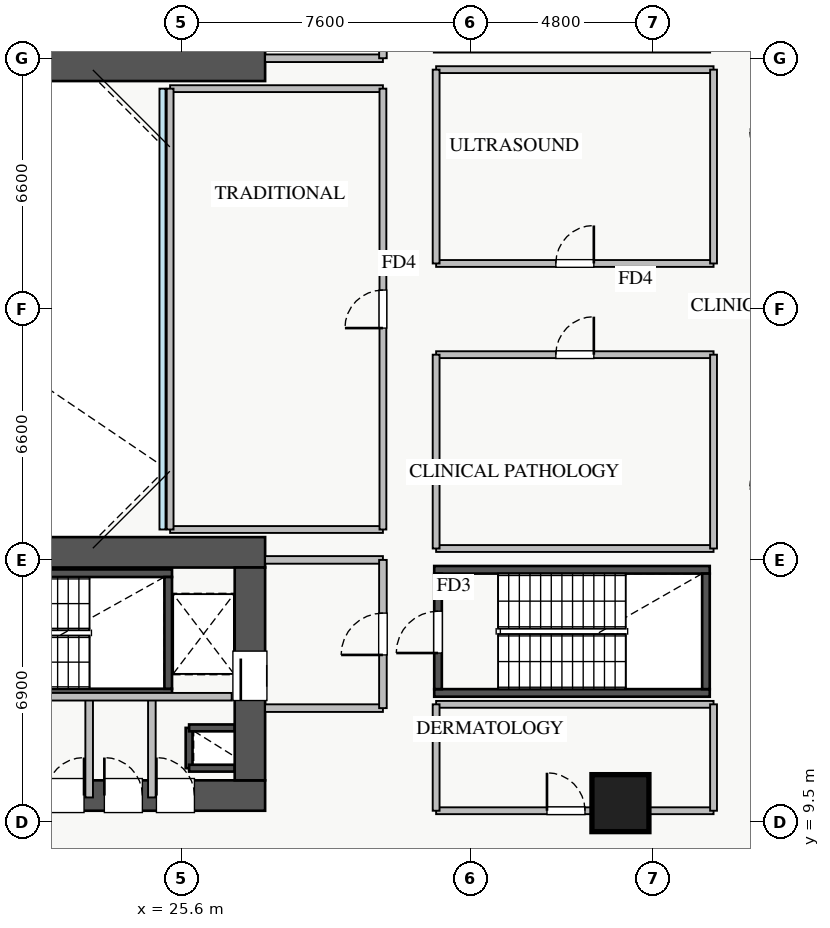
"""IFC4 building model, lengths in metres.
Left out: names, types, materials, properties, quantities, classifications, styles, units other than length and angle.
Written with IfcOpenShell. Run it as: python <this file> out.ifc"""

import sys

from ifc_helpers import new_model, si_unit, direction, frame, frame_2d, origin, origin_2d, place, context, subcontext, project, spatial, rectangle, extrude, source, transform, mapped, element, fill, save


model = new_model("IFC4")
c1 = context("Model", 3, precision=1e-05, world=origin(), true_north=direction((0.0, 1.0)))
c2 = subcontext(c1, "Body", "Model", "MODEL_VIEW")
j1 = project(units=[si_unit("LENGTHUNIT", "METRE"), si_unit("PLANEANGLEUNIT", "RADIAN")], contexts=[c1])
p1 = place(None, origin())
s1 = spatial("IfcSite", under=j1, at=p1, CompositionType="ELEMENT")
p2 = place(p1, origin())
s2 = spatial("IfcBuilding", under=s1, at=p2, CompositionType="ELEMENT")
p3 = place(p2, frame((0.0, 0.0, 9.4)))
s3 = spatial("IfcBuildingStorey", under=s2, at=p3, CompositionType="ELEMENT", Elevation=9.4)
p4 = place(p3, frame((25.8, 10.92, 0.0), z_axis=(0.0, 0.0, 1.0), x_axis=(0.0, 1.0, 0.0)))
e1 = element("IfcWall", 1, at=p4, inside=s3, PredefinedType="SHEAR", context=c2, shape_type="SweptSolid", body=[
    extrude(rectangle(XDim=1.06, YDim=0.18, at=frame_2d((0.53, 0.0))), origin(), (0.0, 0.0, 1.0), 4.18),
])
for number, where, z_axis, x_axis in (
    (2, (25.8, 11.98, 0.0), (0.0, 0.0, 1.0), (1.0, 0.0, 0.0)),
    (3, (25.8, 10.92, 0.0), (0.0, 0.0, 1.0), (1.0, 0.0, 0.0)),
):
    element("IfcWall", number, at=place(p3, frame(where, z_axis=z_axis, x_axis=x_axis)), inside=s3, PredefinedType="SHEAR", context=c2, shape_type="SweptSolid", body=[
        extrude(rectangle(XDim=1.2, YDim=0.18, at=frame_2d((0.6, 0.0))), origin(), (0.0, 0.0, 1.0), 4.18),
    ])
p5 = place(p3, frame((18.2, 12.91, 0.0), z_axis=(0.0, 0.0, 1.0), x_axis=(1.0, 0.0, 0.0)))
e4 = element("IfcWall", 4, at=p5, inside=s3, PredefinedType="SHEAR", context=c2, shape_type="SweptSolid", body=[
    extrude(rectangle(XDim=7.15, YDim=0.2, at=frame_2d((3.575, 0.0))), origin(), (0.0, 0.0, 1.0), 4.4),
])
p6 = place(p5, frame((0.35, 0.0, 0.0)))
e5 = element("IfcOpeningElement", 5, at=p6, cuts=e4, PredefinedType="OPENING", context=c2, shape_type="SweptSolid", body=[
    extrude(rectangle(XDim=1.1, YDim=2.05, at=frame_2d((0.55, 1.025))), frame((0.0, 0.11, 0.0), z_axis=(0.0, -1.0, 0.0), x_axis=(1.0, 0.0, 0.0)), (0.0, 0.0, 1.0), 0.22),
])
p7 = place(p3, frame((18.2, 16.05, 0.0), z_axis=(0.0, 0.0, 1.0), x_axis=(1.0, 0.0, 0.0)))
e6 = element("IfcWall", 6, at=p7, inside=s3, PredefinedType="SHEAR", context=c2, shape_type="SweptSolid", body=[
    extrude(rectangle(XDim=7.15, YDim=0.2, at=frame_2d((3.575, 0.0))), origin(), (0.0, 0.0, 1.0), 4.4),
])
p8 = place(p3, frame((25.25, 13.01, 0.0), z_axis=(0.0, 0.0, 1.0), x_axis=(0.0, 1.0, 0.0)))
e7 = element("IfcWall", 7, at=p8, inside=s3, PredefinedType="SHEAR", context=c2, shape_type="SweptSolid", body=[
    extrude(rectangle(XDim=2.94, YDim=0.2, at=frame_2d((1.47, 0.0))), origin(), (0.0, 0.0, 1.0), 4.4),
])
for number, where, z_axis, x_axis in (
    (8, (32.25, 29.86, 0.0), (0.0, 0.0, 1.0), (1.0, 0.0, 0.0)),
    (9, (32.25, 12.9, 0.0), (0.0, 0.0, 1.0), (1.0, 0.0, 0.0)),
    (10, (32.25, 16.14, 0.0), (0.0, 0.0, 1.0), (1.0, 0.0, 0.0)),
):
    element("IfcWall", number, at=place(p3, frame(where, z_axis=z_axis, x_axis=x_axis)), inside=s3, PredefinedType="SHEAR", context=c2, shape_type="SweptSolid", body=[
        extrude(rectangle(XDim=7.25, YDim=0.2, at=frame_2d((3.625, 0.0))), origin(), (0.0, 0.0, 1.0), 4.4),
    ])
p9 = place(p3, frame((32.35, 13.0, 0.0), z_axis=(0.0, 0.0, 1.0), x_axis=(0.0, 1.0, 0.0)))
e11 = element("IfcWall", 11, at=p9, inside=s3, PredefinedType="SHEAR", context=c2, shape_type="SweptSolid", body=[
    extrude(rectangle(XDim=3.04, YDim=0.2, at=frame_2d((1.52, 0.0))), origin(), (0.0, 0.0, 1.0), 4.4),
])
p10 = place(p9, frame((0.95, 0.0, 0.0)))
e12 = element("IfcOpeningElement", 12, at=p10, cuts=e11, PredefinedType="OPENING", context=c2, shape_type="SweptSolid", body=[
    extrude(rectangle(XDim=1.1, YDim=2.05, at=frame_2d((0.55, 1.025))), frame((0.0, 0.11, 0.0), z_axis=(0.0, -1.0, 0.0), x_axis=(1.0, 0.0, 0.0)), (0.0, 0.0, 1.0), 0.22),
])
p11 = place(p3, frame((39.4, 13.0, 0.0), z_axis=(0.0, 0.0, 1.0), x_axis=(0.0, 1.0, 0.0)))
e13 = element("IfcWall", 13, at=p11, inside=s3, PredefinedType="SHEAR", context=c2, shape_type="SweptSolid", body=[
    extrude(rectangle(XDim=3.04, YDim=0.2, at=frame_2d((1.52, 0.0))), origin(), (0.0, 0.0, 1.0), 4.4),
])
p12 = place(p3, frame((10.2, 29.4, 0.0), z_axis=(0.0, 0.0, 1.0), x_axis=(1.0, 0.0, 0.0)))
e14 = element("IfcWall", 14, at=p12, inside=s3, PredefinedType="SHEAR", context=c2, shape_type="SweptSolid", body=[
    extrude(rectangle(XDim=17.6, YDim=0.8, at=frame_2d((8.8, 0.0))), origin(), (0.0, 0.0, 1.0), 4.4),
])
p13 = place(p3, frame((10.2, 10.2, 0.0), z_axis=(0.0, 0.0, 1.0), x_axis=(1.0, 0.0, 0.0)))
e15 = element("IfcWall", 15, at=p13, inside=s3, PredefinedType="SHEAR", context=c2, shape_type="SweptSolid", body=[
    extrude(rectangle(XDim=17.6, YDim=0.8, at=frame_2d((8.8, 0.0))), origin(), (0.0, 0.0, 1.0), 4.4),
])
p14 = place(p13, frame((1.15, 0.0, 0.0)))
e16 = element("IfcOpeningElement", 16, at=p14, cuts=e15, PredefinedType="OPENING", context=c2, shape_type="SweptSolid", body=[
    extrude(rectangle(XDim=1.1, YDim=2.05, at=frame_2d((0.55, 1.025))), frame((0.0, 0.41, 0.0), z_axis=(0.0, -1.0, 0.0), x_axis=(1.0, 0.0, 0.0)), (0.0, 0.0, 1.0), 0.82),
])
p15 = place(p13, frame((8.3, 0.0, 0.0)))
e17 = element("IfcOpeningElement", 17, at=p15, cuts=e15, PredefinedType="OPENING", context=c2, shape_type="SweptSolid", body=[
    extrude(rectangle(XDim=1.1, YDim=2.05, at=frame_2d((0.55, 1.025))), frame((0.0, 0.41, 0.0), z_axis=(0.0, -1.0, 0.0), x_axis=(1.0, 0.0, 0.0)), (0.0, 0.0, 1.0), 0.82),
])
p16 = place(p13, frame((10.05, 0.0, 0.0)))
e18 = element("IfcOpeningElement", 18, at=p16, cuts=e15, PredefinedType="OPENING", context=c2, shape_type="SweptSolid", body=[
    extrude(rectangle(XDim=1.1, YDim=2.05, at=frame_2d((0.55, 1.025))), frame((0.0, 0.41, 0.0), z_axis=(0.0, -1.0, 0.0), x_axis=(1.0, 0.0, 0.0)), (0.0, 0.0, 1.0), 0.82),
])
p17 = place(p13, frame((14.74, 0.0, 0.0)))
e19 = element("IfcOpeningElement", 19, at=p17, cuts=e15, PredefinedType="OPENING", context=c2, shape_type="SweptSolid", body=[
    extrude(rectangle(XDim=1.0, YDim=2.05, at=frame_2d((0.5, 1.025))), frame((0.0, 0.41, 0.0), z_axis=(0.0, -1.0, 0.0), x_axis=(1.0, 0.0, 0.0)), (0.0, 0.0, 1.0), 0.82),
])
p18 = place(p13, frame((11.835, 0.0, 0.0)))
e20 = element("IfcOpeningElement", 20, at=p18, cuts=e15, PredefinedType="OPENING", context=c2, shape_type="SweptSolid", body=[
    extrude(rectangle(XDim=1.0, YDim=2.05, at=frame_2d((0.5, 1.025))), frame((0.0, 0.41, 0.0), z_axis=(0.0, -1.0, 0.0), x_axis=(1.0, 0.0, 0.0)), (0.0, 0.0, 1.0), 0.82),
])
p19 = place(p13, frame((13.37, 0.0, 0.0)))
e21 = element("IfcOpeningElement", 21, at=p19, cuts=e15, PredefinedType="OPENING", context=c2, shape_type="SweptSolid", body=[
    extrude(rectangle(XDim=1.0, YDim=2.05, at=frame_2d((0.5, 1.025))), frame((0.0, 0.41, 0.0), z_axis=(0.0, -1.0, 0.0), x_axis=(1.0, 0.0, 0.0)), (0.0, 0.0, 1.0), 0.82),
])
p20 = place(p3, frame((10.2, 16.6, 0.0), z_axis=(0.0, 0.0, 1.0), x_axis=(1.0, 0.0, 0.0)))
e22 = element("IfcWall", 22, at=p20, inside=s3, PredefinedType="SHEAR", context=c2, shape_type="SweptSolid", body=[
    extrude(rectangle(XDim=17.6, YDim=0.8, at=frame_2d((8.8, 0.0))), origin(), (0.0, 0.0, 1.0), 4.4),
])
p21 = place(p3, frame((27.4, 10.6, 0.0), z_axis=(0.0, 0.0, 1.0), x_axis=(0.0, 1.0, 0.0)))
e23 = element("IfcWall", 23, at=p21, inside=s3, PredefinedType="SHEAR", context=c2, shape_type="SweptSolid", body=[
    extrude(rectangle(XDim=5.6, YDim=0.8, at=frame_2d((2.8, 0.0))), origin(), (0.0, 0.0, 1.0), 4.4),
])
p22 = place(p21, frame((2.1, 0.0, 0.0)))
e24 = element("IfcOpeningElement", 24, at=p22, cuts=e23, PredefinedType="OPENING", context=c2, shape_type="SweptSolid", body=[
    extrude(rectangle(XDim=1.3, YDim=2.05, at=frame_2d((0.65, 1.025))), frame((0.0, 0.41, 0.0), z_axis=(0.0, -1.0, 0.0), x_axis=(1.0, 0.0, 0.0)), (0.0, 0.0, 1.0), 0.82),
])
m1 = source(origin(), c2, "Body", "SweptSolid", [
    extrude(rectangle(XDim=1.5, YDim=1.5, at=origin_2d()), origin(), (0.0, 0.0, 1.0), 4.4),
])
p23 = place(p3, frame((37.15, 10.0, 0.0), z_axis=(0.0, 0.0, 1.0), x_axis=(1.0, 0.0, 0.0)))
e25 = element("IfcColumn", 25, at=p23, inside=s3, PredefinedType="COLUMN", context=c2, shape_type="MappedRepresentation", body=[
    mapped(m1, transform((0.0, 0.0, 0.0), x_axis=(1.0, 0.0, 0.0), y_axis=(0.0, 1.0, 0.0), z_axis=(0.0, 0.0, 1.0), scale=1.0)),
])
p24 = place(p3, frame((27.8, 29.6, 0.0), z_axis=(0.0, 0.0, 1.0), x_axis=(1.0, 0.0, 0.0)))
e26 = element("IfcWall", 26, at=p24, inside=s3, PredefinedType="PARTITIONING", context=c2, shape_type="SweptSolid", body=[
    extrude(rectangle(XDim=3.1, YDim=0.2, at=frame_2d((1.55, 0.0))), origin(), (0.0, 0.0, 1.0), 3.475),
])
p25 = place(p3, frame((30.9, 29.6, 0.0), z_axis=(0.0, 0.0, 1.0), x_axis=(0.0, 1.0, 0.0)))
e27 = element("IfcWall", 27, at=p25, inside=s3, PredefinedType="PARTITIONING", context=c2, shape_type="SweptSolid", body=[
    extrude(rectangle(XDim=3.9, YDim=0.2, at=frame_2d((1.95, 0.0))), origin(), (0.0, 0.0, 1.0), 4.18),
])
p26 = place(p25, frame((1.4, 0.0, 0.0)))
e28 = element("IfcOpeningElement", 28, at=p26, cuts=e27, PredefinedType="OPENING", context=c2, shape_type="SweptSolid", body=[
    extrude(rectangle(XDim=1.1, YDim=2.05, at=frame_2d((0.55, 1.025))), frame((0.0, 0.11, 0.0), z_axis=(0.0, -1.0, 0.0), x_axis=(1.0, 0.0, 0.0)), (0.0, 0.0, 1.0), 0.22),
])
p27 = place(p3, frame((27.8, 16.4, 0.0), z_axis=(0.0, 0.0, 1.0), x_axis=(1.0, 0.0, 0.0)))
e29 = element("IfcWall", 29, at=p27, inside=s3, PredefinedType="PARTITIONING", context=c2, shape_type="SweptSolid", body=[
    extrude(rectangle(XDim=3.1, YDim=0.2, at=frame_2d((1.55, 0.0))), origin(), (0.0, 0.0, 1.0), 3.475),
])
p28 = place(p3, frame((27.8, 12.5, 0.0), z_axis=(0.0, 0.0, 1.0), x_axis=(1.0, 0.0, 0.0)))
e30 = element("IfcWall", 30, at=p28, inside=s3, PredefinedType="PARTITIONING", context=c2, shape_type="SweptSolid", body=[
    extrude(rectangle(XDim=3.1, YDim=0.2, at=frame_2d((1.55, 0.0))), origin(), (0.0, 0.0, 1.0), 3.325),
])
p29 = place(p3, frame((30.9, 12.5, 0.0), z_axis=(0.0, 0.0, 1.0), x_axis=(0.0, 1.0, 0.0)))
e31 = element("IfcWall", 31, at=p29, inside=s3, PredefinedType="PARTITIONING", context=c2, shape_type="SweptSolid", body=[
    extrude(rectangle(XDim=3.9, YDim=0.2, at=frame_2d((1.95, 0.0))), origin(), (0.0, 0.0, 1.0), 4.18),
])
p30 = place(p29, frame((1.4, 0.0, 0.0)))
e32 = element("IfcOpeningElement", 32, at=p30, cuts=e31, PredefinedType="OPENING", context=c2, shape_type="SweptSolid", body=[
    extrude(rectangle(XDim=1.1, YDim=2.05, at=frame_2d((0.55, 1.025))), frame((0.0, 0.11, 0.0), z_axis=(0.0, -1.0, 0.0), x_axis=(1.0, 0.0, 0.0)), (0.0, 0.0, 1.0), 0.22),
])
for number, where, z_axis, x_axis in (
    (33, (24.82, 10.15, 0.0), (0.0, 0.0, 1.0), (0.0, 1.0, 0.0)),
    (34, (23.17, 10.15, 0.0), (0.0, 0.0, 1.0), (0.0, 1.0, 0.0)),
):
    element("IfcWall", number, at=place(p3, frame(where, z_axis=z_axis, x_axis=x_axis)), inside=s3, PredefinedType="PARTITIONING", context=c2, shape_type="SweptSolid", body=[
        extrude(rectangle(XDim=2.65, YDim=0.2, at=frame_2d((1.325, 0.0))), origin(), (0.0, 0.0, 1.0), 4.18),
    ])
p31 = place(p3, frame((21.75, 12.8, 0.0), z_axis=(0.0, 0.0, 1.0), x_axis=(1.0, 0.0, 0.0)))
e35 = element("IfcWall", 35, at=p31, inside=s3, PredefinedType="PARTITIONING", context=c2, shape_type="SweptSolid", body=[
    extrude(rectangle(XDim=5.17, YDim=0.2, at=frame_2d((2.585, 0.0))), origin(), (0.0, 0.0, 1.0), 4.18),
])
for number, where, z_axis, x_axis in (
    (36, (25.3, 17.2, 0.0), (0.0, 0.0, 1.0), (1.0, 0.0, 0.0)),
    (37, (25.3, 28.8, 0.0), (0.0, 0.0, 1.0), (1.0, 0.0, 0.0)),
):
    element("IfcWall", number, at=place(p3, frame(where, z_axis=z_axis, x_axis=x_axis)), inside=s3, PredefinedType="PARTITIONING", context=c2, shape_type="SweptSolid", body=[
        extrude(rectangle(XDim=5.6, YDim=0.18, at=frame_2d((2.8, 0.0))), origin(), (0.0, 0.0, 1.0), 4.18),
    ])
p32 = place(p3, frame((25.3, 17.2, 0.0), z_axis=(0.0, 0.0, 1.0), x_axis=(0.0, 1.0, 0.0)))
e38 = element("IfcWall", 38, at=p32, inside=s3, PredefinedType="PARTITIONING", context=c2, shape_type="SweptSolid", body=[
    extrude(rectangle(XDim=11.6, YDim=0.18, at=frame_2d((5.8, 0.0))), origin(), (0.0, 0.0, 1.0), 4.18),
])
p33 = place(p3, frame((30.9, 17.2, 0.0), z_axis=(0.0, 0.0, 1.0), x_axis=(0.0, 1.0, 0.0)))
e39 = element("IfcWall", 39, at=p33, inside=s3, PredefinedType="PARTITIONING", context=c2, shape_type="SweptSolid", body=[
    extrude(rectangle(XDim=11.6, YDim=0.18, at=frame_2d((5.8, 0.0))), origin(), (0.0, 0.0, 1.0), 4.18),
])
p34 = place(p33, frame((5.3, 0.0, 0.0)))
e40 = element("IfcOpeningElement", 40, at=p34, cuts=e39, PredefinedType="OPENING", context=c2, shape_type="SweptSolid", body=[
    extrude(rectangle(XDim=1.0, YDim=2.05, at=frame_2d((0.5, 1.025))), frame((0.0, 0.1, 0.0), z_axis=(0.0, -1.0, 0.0), x_axis=(1.0, 0.0, 0.0)), (0.0, 0.0, 1.0), 0.2),
])
p35 = place(p3, frame((32.3, 24.2, 0.0), z_axis=(0.0, 0.0, 1.0), x_axis=(1.0, 0.0, 0.0)))
e41 = element("IfcWall", 41, at=p35, inside=s3, PredefinedType="PARTITIONING", context=c2, shape_type="SweptSolid", body=[
    extrude(rectangle(XDim=7.3, YDim=0.18, at=frame_2d((3.65, 0.0))), origin(), (0.0, 0.0, 1.0), 4.18),
])
p36 = place(p35, frame((3.15, 0.0, 0.0)))
e42 = element("IfcOpeningElement", 42, at=p36, cuts=e41, PredefinedType="OPENING", context=c2, shape_type="SweptSolid", body=[
    extrude(rectangle(XDim=1.0, YDim=2.05, at=frame_2d((0.5, 1.025))), frame((0.0, 0.1, 0.0), z_axis=(0.0, -1.0, 0.0), x_axis=(1.0, 0.0, 0.0)), (0.0, 0.0, 1.0), 0.2),
])
p37 = place(p3, frame((32.3, 29.3, 0.0), z_axis=(0.0, 0.0, 1.0), x_axis=(1.0, 0.0, 0.0)))
e43 = element("IfcWall", 43, at=p37, inside=s3, PredefinedType="PARTITIONING", context=c2, shape_type="SweptSolid", body=[
    extrude(rectangle(XDim=7.3, YDim=0.18, at=frame_2d((3.65, 0.0))), origin(), (0.0, 0.0, 1.0), 3.475),
])
for number, where, z_axis, x_axis in (
    (44, (32.3, 24.2, 0.0), (0.0, 0.0, 1.0), (0.0, 1.0, 0.0)),
    (45, (39.6, 24.2, 0.0), (0.0, 0.0, 1.0), (0.0, 1.0, 0.0)),
):
    element("IfcWall", number, at=place(p3, frame(where, z_axis=z_axis, x_axis=x_axis)), inside=s3, PredefinedType="PARTITIONING", context=c2, shape_type="SweptSolid", body=[
        extrude(rectangle(XDim=5.1, YDim=0.18, at=frame_2d((2.55, 0.0))), origin(), (0.0, 0.0, 1.0), 4.18),
    ])
p38 = place(p3, frame((32.3, 16.7, 0.0), z_axis=(0.0, 0.0, 1.0), x_axis=(1.0, 0.0, 0.0)))
e46 = element("IfcWall", 46, at=p38, inside=s3, PredefinedType="PARTITIONING", context=c2, shape_type="SweptSolid", body=[
    extrude(rectangle(XDim=7.3, YDim=0.18, at=frame_2d((3.65, 0.0))), origin(), (0.0, 0.0, 1.0), 3.475),
])
p39 = place(p3, frame((32.3, 21.8, 0.0), z_axis=(0.0, 0.0, 1.0), x_axis=(1.0, 0.0, 0.0)))
e47 = element("IfcWall", 47, at=p39, inside=s3, PredefinedType="PARTITIONING", context=c2, shape_type="SweptSolid", body=[
    extrude(rectangle(XDim=7.3, YDim=0.18, at=frame_2d((3.65, 0.0))), origin(), (0.0, 0.0, 1.0), 4.18),
])
p40 = place(p39, frame((3.15, 0.0, 0.0)))
e48 = element("IfcOpeningElement", 48, at=p40, cuts=e47, PredefinedType="OPENING", context=c2, shape_type="SweptSolid", body=[
    extrude(rectangle(XDim=1.0, YDim=2.05, at=frame_2d((0.5, 1.025))), frame((0.0, 0.1, 0.0), z_axis=(0.0, -1.0, 0.0), x_axis=(1.0, 0.0, 0.0)), (0.0, 0.0, 1.0), 0.2),
])
for number, where, z_axis, x_axis in (
    (49, (32.3, 16.7, 0.0), (0.0, 0.0, 1.0), (0.0, 1.0, 0.0)),
    (50, (39.6, 16.7, 0.0), (0.0, 0.0, 1.0), (0.0, 1.0, 0.0)),
):
    element("IfcWall", number, at=place(p3, frame(where, z_axis=z_axis, x_axis=x_axis)), inside=s3, PredefinedType="PARTITIONING", context=c2, shape_type="SweptSolid", body=[
        extrude(rectangle(XDim=5.1, YDim=0.18, at=frame_2d((2.55, 0.0))), origin(), (0.0, 0.0, 1.0), 4.18),
    ])
p41 = place(p3, frame((32.3, 9.8, 0.0), z_axis=(0.0, 0.0, 1.0), x_axis=(1.0, 0.0, 0.0)))
e51 = element("IfcWall", 51, at=p41, inside=s3, PredefinedType="PARTITIONING", context=c2, shape_type="SweptSolid", body=[
    extrude(rectangle(XDim=7.3, YDim=0.18, at=frame_2d((3.65, 0.0))), origin(), (0.0, 0.0, 1.0), 4.18),
])
p42 = place(p41, frame((2.917, 0.0, 0.0)))
e52 = element("IfcOpeningElement", 52, at=p42, cuts=e51, PredefinedType="OPENING", context=c2, shape_type="SweptSolid", body=[
    extrude(rectangle(XDim=1.0, YDim=2.05, at=frame_2d((0.5, 1.025))), frame((0.0, 0.1, 0.0), z_axis=(0.0, -1.0, 0.0), x_axis=(1.0, 0.0, 0.0)), (0.0, 0.0, 1.0), 0.2),
])
p43 = place(p3, frame((32.3, 12.6, 0.0), z_axis=(0.0, 0.0, 1.0), x_axis=(1.0, 0.0, 0.0)))
e53 = element("IfcWall", 53, at=p43, inside=s3, PredefinedType="PARTITIONING", context=c2, shape_type="SweptSolid", body=[
    extrude(rectangle(XDim=7.3, YDim=0.18, at=frame_2d((3.65, 0.0))), origin(), (0.0, 0.0, 1.0), 3.325),
])
for number, where, z_axis, x_axis in (
    (54, (32.3, 9.8, 0.0), (0.0, 0.0, 1.0), (0.0, 1.0, 0.0)),
    (55, (39.6, 9.8, 0.0), (0.0, 0.0, 1.0), (0.0, 1.0, 0.0)),
):
    element("IfcWall", number, at=place(p3, frame(where, z_axis=z_axis, x_axis=x_axis)), inside=s3, PredefinedType="PARTITIONING", context=c2, shape_type="SweptSolid", body=[
        extrude(rectangle(XDim=2.8, YDim=0.18, at=frame_2d((1.4, 0.0))), origin(), (0.0, 0.0, 1.0), 4.18),
    ])
m2 = source(origin(), c2, "Body", "SweptSolid", [
    extrude(rectangle(XDim=1.3, YDim=2.05, at=frame_2d((0.65, 1.025))), frame((0.0, 0.025, 0.0), z_axis=(0.0, -1.0, 0.0), x_axis=(1.0, 0.0, 0.0)), (0.0, 0.0, 1.0), 0.05),
])
p44 = place(p22, origin())
e56 = element("IfcDoor", 56, at=p44, inside=s3, OperationType="SLIDING_TO_RIGHT", PredefinedType="DOOR", context=c2, shape_type="MappedRepresentation", body=[
    mapped(m2, transform((0.0, 0.0, 0.0), x_axis=(1.0, 0.0, 0.0), y_axis=(0.0, 1.0, 0.0), z_axis=(0.0, 0.0, 1.0), scale=1.0)),
])
fill(e24, e56)
m3 = source(origin(), c2, "Body", "SweptSolid", [
    extrude(rectangle(XDim=1.0, YDim=2.05, at=frame_2d((0.5, 1.025))), frame((0.0, 0.025, 0.0), z_axis=(0.0, -1.0, 0.0), x_axis=(1.0, 0.0, 0.0)), (0.0, 0.0, 1.0), 0.05),
])
p45 = place(p17, origin())
e57 = element("IfcDoor", 57, at=p45, inside=s3, OperationType="SINGLE_SWING_LEFT", PredefinedType="DOOR", context=c2, shape_type="MappedRepresentation", body=[
    mapped(m3, transform((0.0, 0.0, 0.0), x_axis=(1.0, 0.0, 0.0), y_axis=(0.0, 1.0, 0.0), z_axis=(0.0, 0.0, 1.0), scale=1.0)),
])
fill(e19, e57)
p46 = place(p18, origin())
e58 = element("IfcDoor", 58, at=p46, inside=s3, OperationType="SINGLE_SWING_RIGHT", PredefinedType="DOOR", context=c2, shape_type="MappedRepresentation", body=[
    mapped(m3, transform((0.0, 0.0, 0.0), x_axis=(1.0, 0.0, 0.0), y_axis=(0.0, 1.0, 0.0), z_axis=(0.0, 0.0, 1.0), scale=1.0)),
])
fill(e20, e58)
p47 = place(p19, origin())
e59 = element("IfcDoor", 59, at=p47, inside=s3, OperationType="SINGLE_SWING_LEFT", PredefinedType="DOOR", context=c2, shape_type="MappedRepresentation", body=[
    mapped(m3, transform((0.0, 0.0, 0.0), x_axis=(1.0, 0.0, 0.0), y_axis=(0.0, 1.0, 0.0), z_axis=(0.0, 0.0, 1.0), scale=1.0)),
])
fill(e21, e59)
m4 = source(origin(), c2, "Body", "SweptSolid", [
    extrude(rectangle(XDim=1.1, YDim=2.05, at=frame_2d((0.55, 1.025))), frame((0.0, 0.025, 0.0), z_axis=(0.0, -1.0, 0.0), x_axis=(1.0, 0.0, 0.0)), (0.0, 0.0, 1.0), 0.05),
])
p48 = place(p10, origin())
e60 = element("IfcDoor", 60, at=p48, inside=s3, OperationType="SINGLE_SWING_LEFT", PredefinedType="DOOR", context=c2, shape_type="MappedRepresentation", body=[
    mapped(m4, transform((0.0, 0.0, 0.0), x_axis=(1.0, 0.0, 0.0), y_axis=(0.0, 1.0, 0.0), z_axis=(0.0, 0.0, 1.0), scale=1.0)),
])
fill(e12, e60)
p49 = place(p30, origin())
e61 = element("IfcDoor", 61, at=p49, inside=s3, OperationType="SINGLE_SWING_LEFT", PredefinedType="DOOR", context=c2, shape_type="MappedRepresentation", body=[
    mapped(m4, transform((0.0, 0.0, 0.0), x_axis=(1.0, 0.0, 0.0), y_axis=(0.0, 1.0, 0.0), z_axis=(0.0, 0.0, 1.0), scale=1.0)),
])
fill(e32, e61)
p50 = place(p34, origin())
e62 = element("IfcDoor", 62, at=p50, inside=s3, OperationType="SINGLE_SWING_LEFT", PredefinedType="DOOR", context=c2, shape_type="MappedRepresentation", body=[
    mapped(m3, transform((0.0, 0.0, 0.0), x_axis=(1.0, 0.0, 0.0), y_axis=(0.0, 1.0, 0.0), z_axis=(0.0, 0.0, 1.0), scale=1.0)),
])
fill(e40, e62)
p51 = place(p36, origin())
e63 = element("IfcDoor", 63, at=p51, inside=s3, OperationType="SINGLE_SWING_RIGHT", PredefinedType="DOOR", context=c2, shape_type="MappedRepresentation", body=[
    mapped(m3, transform((0.0, 0.0, 0.0), x_axis=(1.0, 0.0, 0.0), y_axis=(0.0, 1.0, 0.0), z_axis=(0.0, 0.0, 1.0), scale=1.0)),
])
fill(e42, e63)
p52 = place(p40, origin())
e64 = element("IfcDoor", 64, at=p52, inside=s3, OperationType="SINGLE_SWING_RIGHT", PredefinedType="DOOR", context=c2, shape_type="MappedRepresentation", body=[
    mapped(m3, transform((0.0, 0.0, 0.0), x_axis=(1.0, 0.0, 0.0), y_axis=(0.0, 1.0, 0.0), z_axis=(0.0, 0.0, 1.0), scale=1.0)),
])
fill(e48, e64)
p53 = place(p42, origin())
e65 = element("IfcDoor", 65, at=p53, inside=s3, OperationType="SINGLE_SWING_LEFT", PredefinedType="DOOR", context=c2, shape_type="MappedRepresentation", body=[
    mapped(m3, transform((0.0, 0.0, 0.0), x_axis=(1.0, 0.0, 0.0), y_axis=(0.0, 1.0, 0.0), z_axis=(0.0, 0.0, 1.0), scale=1.0)),
])
fill(e52, e65)
save(model, sys.argv[1])
